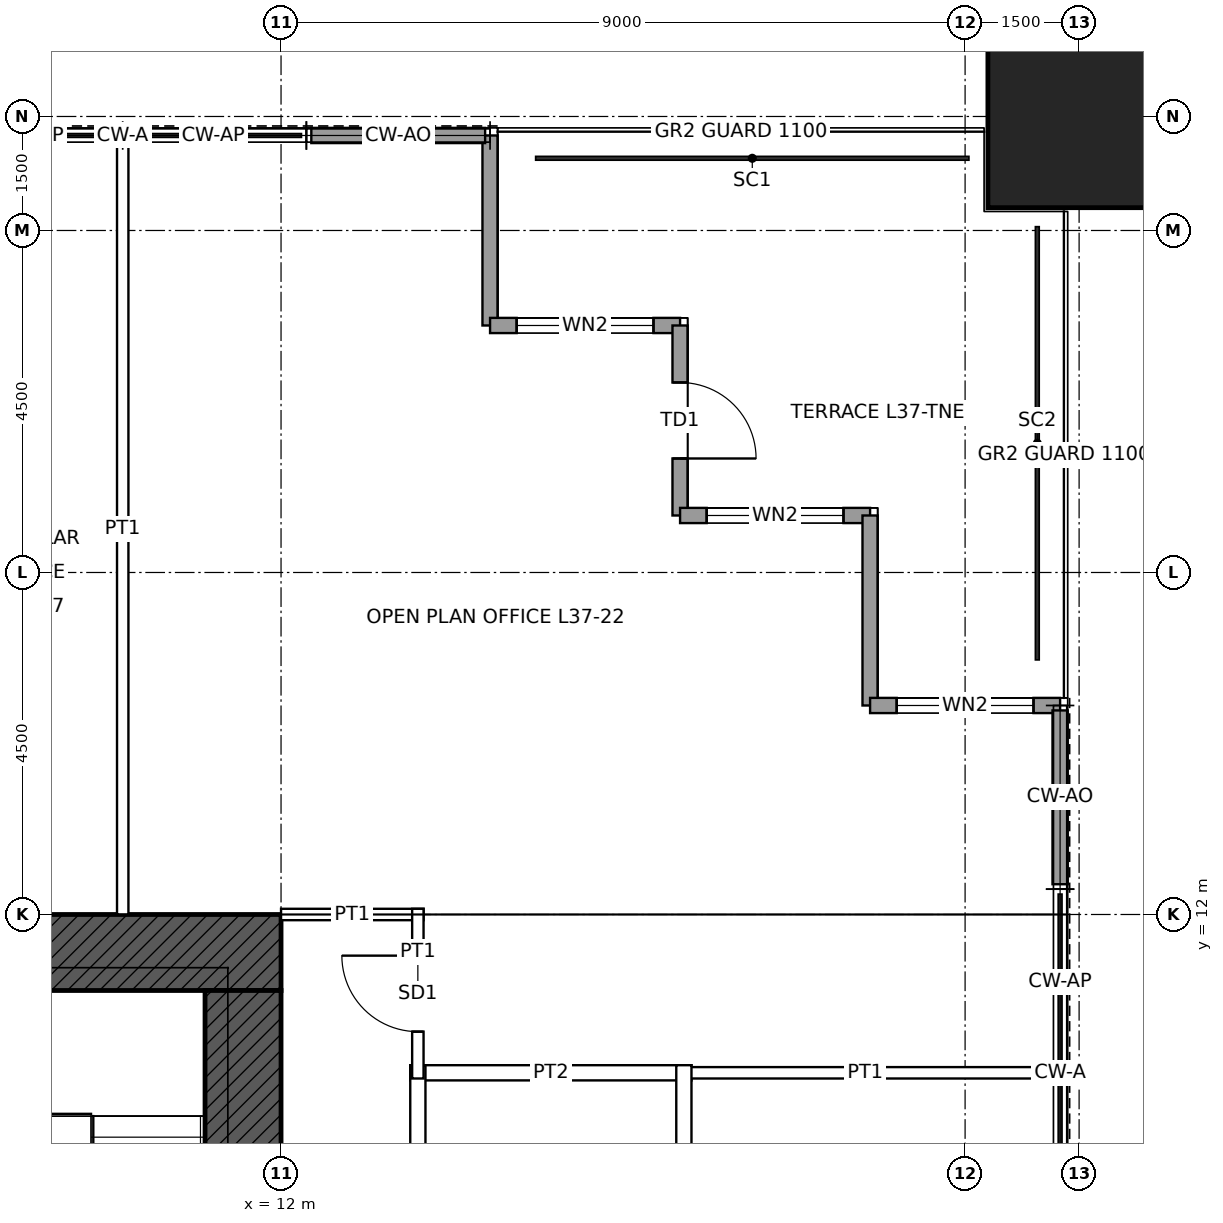
"""IFC4 building model, lengths in metres.
Left out: names, types, materials, properties, quantities, classifications, styles, units other than length and angle.
Written with IfcOpenShell. Run it as: python <this file> out.ifc"""

import sys

from ifc_helpers import new_model, si_unit, direction, frame, frame_2d, origin, origin_2d, place, context, subcontext, project, spatial, rectangle, hollow_rectangle, extrude, element, fill, save


model = new_model("IFC4")
c1 = context("Model", 3, precision=1e-05, world=origin(), true_north=direction((0.0, 1.0)))
c2 = subcontext(c1, "Body", "Model", "MODEL_VIEW")
j1 = project(units=[si_unit("LENGTHUNIT", "METRE"), si_unit("PLANEANGLEUNIT", "RADIAN")], contexts=[c1])
p1 = place(None, origin())
s1 = spatial("IfcSite", under=j1, at=p1, CompositionType="ELEMENT")
p2 = place(p1, origin())
s2 = spatial("IfcBuilding", under=s1, at=p2, CompositionType="ELEMENT")
p3 = place(p2, frame((0.0, 0.0, 181.9)))
s3 = spatial("IfcBuildingStorey", under=s2, at=p3, CompositionType="ELEMENT", Elevation=181.9)
p4 = place(p3, frame((22.5, 22.5, 0.0), z_axis=(0.0, 0.0, 1.0), x_axis=(1.0, 0.0, 0.0)))
e1 = element("IfcColumn", 1, at=p4, inside=s3, PredefinedType="COLUMN", context=c2, shape_type="SweptSolid", body=[
    extrude(hollow_rectangle(XDim=2.4, YDim=2.4, WallThickness=0.12, at=origin_2d()), origin(), (0.0, 0.0, 1.0), 4.0),
])
p5 = place(p3, frame((-12.0, 11.5, 0.0), z_axis=(0.0, 0.0, 1.0), x_axis=(1.0, 0.0, 0.0)))
e2 = element("IfcWall", 2, at=p5, inside=s3, PredefinedType="SHEAR", context=c2, shape_type="SweptSolid", body=[
    extrude(rectangle(XDim=24.0, YDim=1.0, at=frame_2d((12.0, 0.0))), origin(), (0.0, 0.0, 1.0), 4.0),
])
p6 = place(p5, frame((6.25, 0.0, 0.0)))
e3 = element("IfcOpeningElement", 3, at=p6, cuts=e2, PredefinedType="OPENING", context=c2, shape_type="SweptSolid", body=[
    extrude(rectangle(XDim=1.0, YDim=2.4, at=frame_2d((0.5, 1.2))), frame((0.0, 0.51, 0.0), z_axis=(0.0, -1.0, 0.0), x_axis=(1.0, 0.0, 0.0)), (0.0, 0.0, 1.0), 1.02),
])
p7 = place(p5, frame((16.75, 0.0, 0.0)))
e4 = element("IfcOpeningElement", 4, at=p7, cuts=e2, PredefinedType="OPENING", context=c2, shape_type="SweptSolid", body=[
    extrude(rectangle(XDim=1.0, YDim=2.4, at=frame_2d((0.5, 1.2))), frame((0.0, 0.51, 0.0), z_axis=(0.0, -1.0, 0.0), x_axis=(1.0, 0.0, 0.0)), (0.0, 0.0, 1.0), 1.02),
])
p8 = place(p3, frame((11.5, 11.0, 0.0), z_axis=(0.0, 0.0, 1.0), x_axis=(0.0, -1.0, 0.0)))
e5 = element("IfcWall", 5, at=p8, inside=s3, PredefinedType="SHEAR", context=c2, shape_type="SweptSolid", body=[
    extrude(rectangle(XDim=22.0, YDim=1.0, at=frame_2d((11.0, 0.0))), origin(), (0.0, 0.0, 1.0), 4.0),
])
p9 = place(p8, frame((10.5, 0.0, 0.0)))
e6 = element("IfcOpeningElement", 6, at=p9, cuts=e5, PredefinedType="OPENING", context=c2, shape_type="SweptSolid", body=[
    extrude(rectangle(XDim=1.0, YDim=2.4, at=frame_2d((0.5, 1.2))), frame((0.0, 0.51, 0.0), z_axis=(0.0, -1.0, 0.0), x_axis=(1.0, 0.0, 0.0)), (0.0, 0.0, 1.0), 1.02),
])
p10 = place(p3, frame((14.75, 22.25, 0.0), z_axis=(0.0, 0.0, 1.0), x_axis=(0.0, -1.0, 0.0)))
e7 = element("IfcWall", 7, at=p10, inside=s3, PredefinedType="SOLIDWALL", context=c2, shape_type="SweptSolid", body=[
    extrude(rectangle(XDim=2.5, YDim=0.2, at=frame_2d((1.25, 0.0))), origin(), (0.0, 0.0, 1.0), 3.85),
])
p11 = place(p3, frame((14.75, 19.75, 0.0), z_axis=(0.0, 0.0, 1.0), x_axis=(1.0, 0.0, 0.0)))
e8 = element("IfcWall", 8, at=p11, inside=s3, PredefinedType="SOLIDWALL", context=c2, shape_type="SweptSolid", body=[
    extrude(rectangle(XDim=2.5, YDim=0.2, at=frame_2d((1.25, 0.0))), origin(), (0.0, 0.0, 1.0), 3.85),
])
p12 = place(p11, frame((0.35, 0.0, 0.3)))
e9 = element("IfcOpeningElement", 9, at=p12, cuts=e8, PredefinedType="OPENING", context=c2, shape_type="SweptSolid", body=[
    extrude(rectangle(XDim=1.8, YDim=2.4, at=frame_2d((0.9, 1.2))), frame((0.0, 0.11, 0.0), z_axis=(0.0, -1.0, 0.0), x_axis=(1.0, 0.0, 0.0)), (0.0, 0.0, 1.0), 0.22),
])
p13 = place(p3, frame((17.25, 19.75, 0.0), z_axis=(0.0, 0.0, 1.0), x_axis=(0.0, -1.0, 0.0)))
e10 = element("IfcWall", 10, at=p13, inside=s3, PredefinedType="SOLIDWALL", context=c2, shape_type="SweptSolid", body=[
    extrude(rectangle(XDim=2.5, YDim=0.2, at=frame_2d((1.25, 0.0))), origin(), (0.0, 0.0, 1.0), 3.85),
])
p14 = place(p13, frame((0.75, 0.0, 0.0)))
e11 = element("IfcOpeningElement", 11, at=p14, cuts=e10, PredefinedType="OPENING", context=c2, shape_type="SweptSolid", body=[
    extrude(rectangle(XDim=1.0, YDim=2.4, at=frame_2d((0.5, 1.2))), frame((0.0, 0.11, 0.0), z_axis=(0.0, -1.0, 0.0), x_axis=(1.0, 0.0, 0.0)), (0.0, 0.0, 1.0), 0.22),
])
p15 = place(p3, frame((17.25, 17.25, 0.0), z_axis=(0.0, 0.0, 1.0), x_axis=(1.0, 0.0, 0.0)))
e12 = element("IfcWall", 12, at=p15, inside=s3, PredefinedType="SOLIDWALL", context=c2, shape_type="SweptSolid", body=[
    extrude(rectangle(XDim=2.5, YDim=0.2, at=frame_2d((1.25, 0.0))), origin(), (0.0, 0.0, 1.0), 3.85),
])
p16 = place(p15, frame((0.35, 0.0, 0.3)))
e13 = element("IfcOpeningElement", 13, at=p16, cuts=e12, PredefinedType="OPENING", context=c2, shape_type="SweptSolid", body=[
    extrude(rectangle(XDim=1.8, YDim=2.4, at=frame_2d((0.9, 1.2))), frame((0.0, 0.11, 0.0), z_axis=(0.0, -1.0, 0.0), x_axis=(1.0, 0.0, 0.0)), (0.0, 0.0, 1.0), 0.22),
])
p17 = place(p3, frame((19.75, 17.25, 0.0), z_axis=(0.0, 0.0, 1.0), x_axis=(0.0, -1.0, 0.0)))
e14 = element("IfcWall", 14, at=p17, inside=s3, PredefinedType="SOLIDWALL", context=c2, shape_type="SweptSolid", body=[
    extrude(rectangle(XDim=2.5, YDim=0.2, at=frame_2d((1.25, 0.0))), origin(), (0.0, 0.0, 1.0), 3.85),
])
p18 = place(p3, frame((19.75, 14.75, 0.0), z_axis=(0.0, 0.0, 1.0), x_axis=(1.0, 0.0, 0.0)))
e15 = element("IfcWall", 15, at=p18, inside=s3, PredefinedType="SOLIDWALL", context=c2, shape_type="SweptSolid", body=[
    extrude(rectangle(XDim=2.5, YDim=0.2, at=frame_2d((1.25, 0.0))), origin(), (0.0, 0.0, 1.0), 3.85),
])
p19 = place(p18, frame((0.35, 0.0, 0.3)))
e16 = element("IfcOpeningElement", 16, at=p19, cuts=e15, PredefinedType="OPENING", context=c2, shape_type="SweptSolid", body=[
    extrude(rectangle(XDim=1.8, YDim=2.4, at=frame_2d((0.9, 1.2))), frame((0.0, 0.11, 0.0), z_axis=(0.0, -1.0, 0.0), x_axis=(1.0, 0.0, 0.0)), (0.0, 0.0, 1.0), 0.22),
])
for number, where, z_axis, x_axis in (
    (17, (12.398, 22.25, 0.0), (0.0, 0.0, 1.0), (1.0, 0.0, 0.0)),
    (18, (22.25, 14.685, 0.0), (0.0, 0.0, 1.0), (0.0, -1.0, 0.0)),
):
    element("IfcWall", number, at=place(p3, frame(where, z_axis=z_axis, x_axis=x_axis)), inside=s3, PredefinedType="SOLIDWALL", context=c2, shape_type="SweptSolid", body=[
        extrude(rectangle(XDim=2.287, YDim=0.2, at=frame_2d((1.144, 0.0))), origin(), (0.0, 0.0, 1.0), 3.85),
    ])
p20 = place(p3, frame((13.7, 9.917, 0.0), z_axis=(0.0, 0.0, 1.0), x_axis=(1.0, 0.0, 0.0)))
e19 = element("IfcWall", 19, at=p20, inside=s3, PredefinedType="PARTITIONING", context=c2, shape_type="SweptSolid", body=[
    extrude(rectangle(XDim=3.7, YDim=0.2, at=frame_2d((1.85, 0.0))), origin(), (0.0, 0.0, 1.0), 3.85),
])
p21 = place(p3, frame((17.225, 9.917, 0.0), z_axis=(0.0, 0.0, 1.0), x_axis=(1.0, 0.0, 0.0)))
e20 = element("IfcWall", 20, at=p21, inside=s3, PredefinedType="PARTITIONING", context=c2, shape_type="SweptSolid", body=[
    extrude(rectangle(XDim=4.925, YDim=0.15, at=frame_2d((2.462, 0.0))), origin(), (0.0, 0.0, 1.0), 3.85),
])
p22 = place(p3, frame((12.0, 12.0, 0.0), z_axis=(0.0, 0.0, 1.0), x_axis=(1.0, 0.0, 0.0)))
e21 = element("IfcWall", 21, at=p22, inside=s3, PredefinedType="PARTITIONING", context=c2, shape_type="SweptSolid", body=[
    extrude(rectangle(XDim=1.875, YDim=0.15, at=frame_2d((0.938, 0.0))), origin(), (0.0, 0.0, 1.0), 2.908),
])
p23 = place(p3, frame((9.917, 12.0, 0.0), z_axis=(0.0, 0.0, 1.0), x_axis=(0.0, 1.0, 0.0)))
e22 = element("IfcWall", 22, at=p23, inside=s3, PredefinedType="PARTITIONING", context=c2, shape_type="SweptSolid", body=[
    extrude(rectangle(XDim=10.15, YDim=0.15, at=frame_2d((5.075, 0.0))), origin(), (0.0, 0.0, 1.0), 3.85),
])
p24 = place(p3, frame((13.8, 4.9, 0.0), z_axis=(0.0, 0.0, 1.0), x_axis=(0.0, 1.0, 0.0)))
e23 = element("IfcWall", 23, at=p24, inside=s3, PredefinedType="PARTITIONING", context=c2, shape_type="SweptSolid", body=[
    extrude(rectangle(XDim=5.117, YDim=0.2, at=frame_2d((2.559, 0.0))), origin(), (0.0, 0.0, 1.0), 3.85),
])
p25 = place(p3, frame((13.8, 9.842, 0.0), z_axis=(0.0, 0.0, 1.0), x_axis=(0.0, 1.0, 0.0)))
e24 = element("IfcWall", 24, at=p25, inside=s3, PredefinedType="PARTITIONING", context=c2, shape_type="SweptSolid", body=[
    extrude(rectangle(XDim=2.233, YDim=0.15, at=frame_2d((1.116, 0.0))), origin(), (0.0, 0.0, 1.0), 3.85),
])
p26 = place(p25, frame((0.616, 0.0, 0.0)))
e25 = element("IfcOpeningElement", 25, at=p26, cuts=e24, PredefinedType="OPENING", context=c2, shape_type="SweptSolid", body=[
    extrude(rectangle(XDim=1.0, YDim=2.4, at=frame_2d((0.5, 1.2))), frame((0.0, 0.085, 0.0), z_axis=(0.0, -1.0, 0.0), x_axis=(1.0, 0.0, 0.0)), (0.0, 0.0, 1.0), 0.17),
])
p27 = place(p3, frame((17.3, 4.9, 0.0), z_axis=(0.0, 0.0, 1.0), x_axis=(0.0, 1.0, 0.0)))
e26 = element("IfcWall", 26, at=p27, inside=s3, PredefinedType="PARTITIONING", context=c2, shape_type="SweptSolid", body=[
    extrude(rectangle(XDim=5.117, YDim=0.2, at=frame_2d((2.559, 0.0))), origin(), (0.0, 0.0, 1.0), 3.85),
])
p28 = place(p27, frame((2.059, 0.0, 0.0)))
e27 = element("IfcOpeningElement", 27, at=p28, cuts=e26, PredefinedType="OPENING", context=c2, shape_type="SweptSolid", body=[
    extrude(rectangle(XDim=1.0, YDim=2.1, at=frame_2d((0.5, 1.05))), frame((0.0, 0.11, 0.0), z_axis=(0.0, -1.0, 0.0), x_axis=(1.0, 0.0, 0.0)), (0.0, 0.0, 1.0), 0.22),
])
p29 = place(p12, origin())
e28 = element("IfcWindow", 28, at=p29, inside=s3, PartitioningType="SINGLE_PANEL", PredefinedType="WINDOW", context=c2, shape_type="SweptSolid", body=[
    extrude(rectangle(XDim=1.8, YDim=2.4, at=frame_2d((0.9, 1.2))), frame((0.0, 0.03, 0.0), z_axis=(0.0, -1.0, 0.0), x_axis=(1.0, 0.0, 0.0)), (0.0, 0.0, 1.0), 0.06),
])
fill(e9, e28)
p30 = place(p14, origin())
e29 = element("IfcDoor", 29, at=p30, inside=s3, OperationType="SINGLE_SWING_RIGHT", PredefinedType="DOOR", context=c2, shape_type="SweptSolid", body=[
    extrude(rectangle(XDim=1.0, YDim=2.4, at=frame_2d((0.5, 1.2))), frame((0.0, 0.025, 0.0), z_axis=(0.0, -1.0, 0.0), x_axis=(1.0, 0.0, 0.0)), (0.0, 0.0, 1.0), 0.05),
])
fill(e11, e29)
p31 = place(p16, origin())
e30 = element("IfcWindow", 30, at=p31, inside=s3, PartitioningType="SINGLE_PANEL", PredefinedType="WINDOW", context=c2, shape_type="SweptSolid", body=[
    extrude(rectangle(XDim=1.8, YDim=2.4, at=frame_2d((0.9, 1.2))), frame((0.0, 0.03, 0.0), z_axis=(0.0, -1.0, 0.0), x_axis=(1.0, 0.0, 0.0)), (0.0, 0.0, 1.0), 0.06),
])
fill(e13, e30)
p32 = place(p19, origin())
e31 = element("IfcWindow", 31, at=p32, inside=s3, PartitioningType="SINGLE_PANEL", PredefinedType="WINDOW", context=c2, shape_type="SweptSolid", body=[
    extrude(rectangle(XDim=1.8, YDim=2.4, at=frame_2d((0.9, 1.2))), frame((0.0, 0.03, 0.0), z_axis=(0.0, -1.0, 0.0), x_axis=(1.0, 0.0, 0.0)), (0.0, 0.0, 1.0), 0.06),
])
fill(e16, e31)
p33 = place(p26, origin())
e32 = element("IfcDoor", 32, at=p33, inside=s3, OperationType="SINGLE_SWING_RIGHT", PredefinedType="DOOR", context=c2, shape_type="SweptSolid", body=[
    extrude(rectangle(XDim=1.0, YDim=2.4, at=frame_2d((0.5, 1.2))), frame((0.0, 0.025, 0.0), z_axis=(0.0, -1.0, 0.0), x_axis=(1.0, 0.0, 0.0)), (0.0, 0.0, 1.0), 0.05),
])
fill(e25, e32)
save(model, sys.argv[1])
